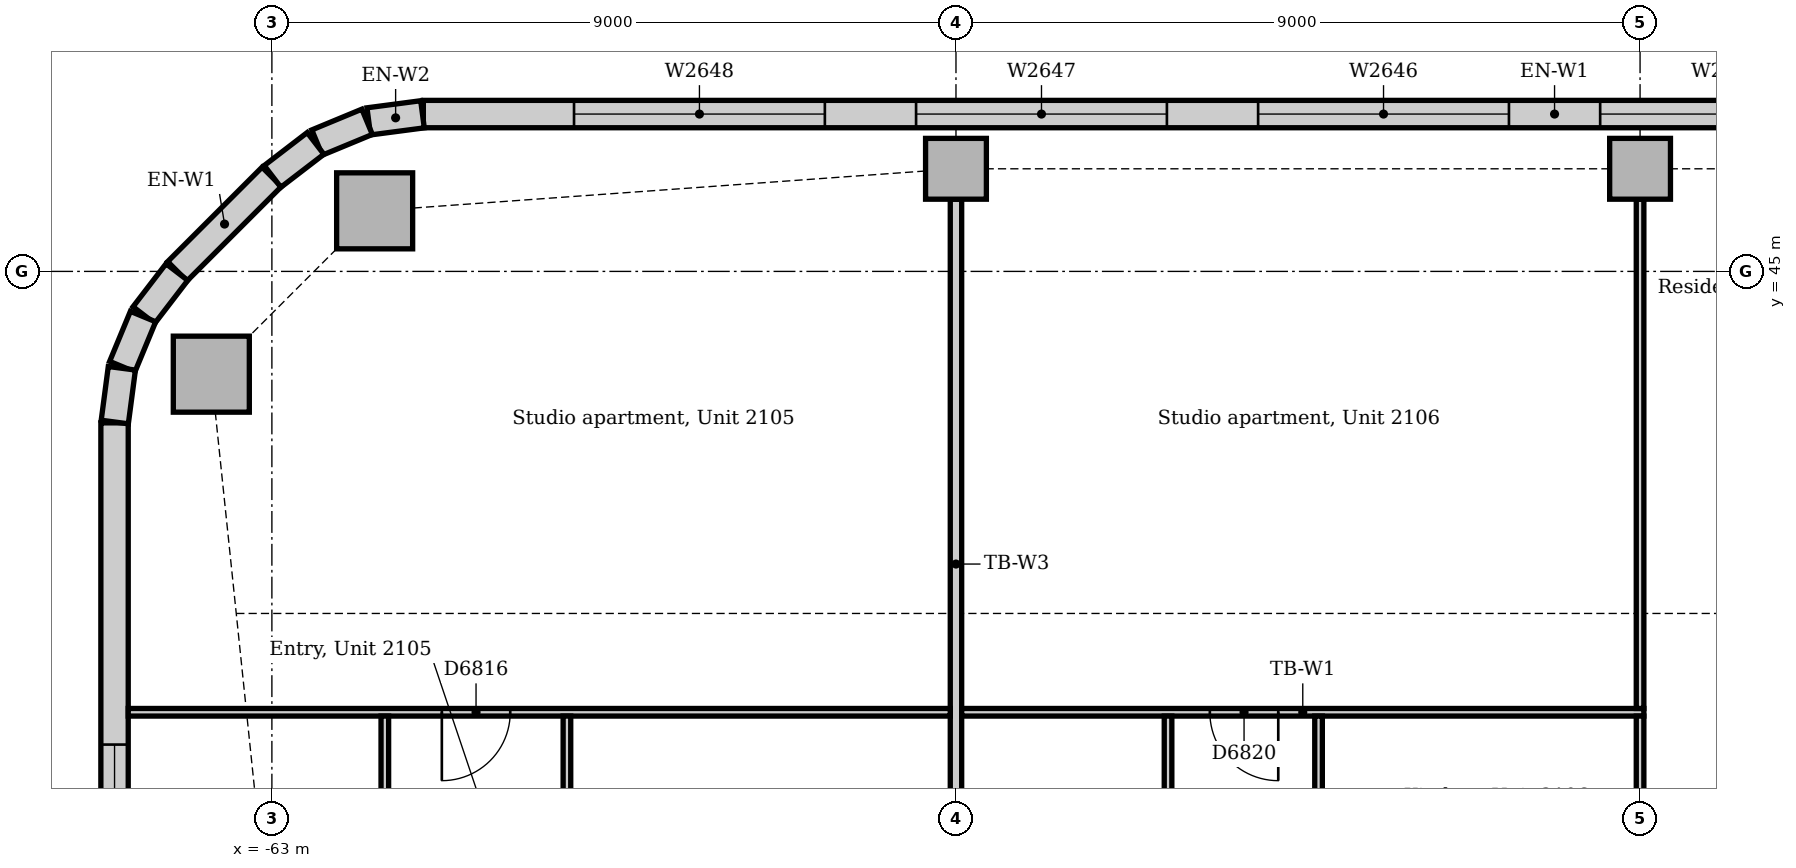
"""IFC4 building model, lengths in metres.
Left out: names, types, materials, properties, quantities, classifications, styles, units other than length and angle.
Written with IfcOpenShell. Run it as: python <this file> out.ifc"""

import sys

from ifc_helpers import new_model, si_unit, direction, frame, frame_2d, origin, origin_2d, place, context, subcontext, project, spatial, rectangle, extrude, element, fill, save


model = new_model("IFC4")
c1 = context("Model", 3, precision=1e-05, world=origin(), true_north=direction((0.0, 1.0)))
c2 = subcontext(c1, "Body", "Model", "MODEL_VIEW")
j1 = project(units=[si_unit("LENGTHUNIT", "METRE"), si_unit("PLANEANGLEUNIT", "RADIAN")], contexts=[c1])
p1 = place(None, origin())
s1 = spatial("IfcSite", under=j1, at=p1, CompositionType="ELEMENT")
p2 = place(p1, origin())
s2 = spatial("IfcBuilding", under=s1, at=p2, CompositionType="ELEMENT")
p3 = place(p2, frame((0.0, 0.0, 91.0)))
s3 = spatial("IfcBuildingStorey", under=s2, at=p3, CompositionType="ELEMENT", Elevation=91.0)
for number, where, z_axis, x_axis in (
    (1, (-61.648, 45.797, 0.0), (0.0, 0.0, 1.0), (1.0, 0.0, 0.0)),
    (2, (-63.797, 43.648, 0.0), (0.0, 0.0, 1.0), (1.0, 0.0, 0.0)),
):
    element("IfcColumn", number, at=place(p3, frame(where, z_axis=z_axis, x_axis=x_axis)), inside=s3, PredefinedType="COLUMN", context=c2, shape_type="SweptSolid", body=[
        extrude(rectangle(XDim=1.0, YDim=1.0, at=origin_2d()), origin(), (0.0, 0.0, 1.0), 3.7),
    ])
for number, where, z_axis, x_axis in (
    (3, (-54.0, 46.35, 0.0), (0.0, 0.0, 1.0), (1.0, 0.0, 0.0)),
    (4, (-45.0, 46.35, 0.0), (0.0, 0.0, 1.0), (1.0, 0.0, 0.0)),
):
    element("IfcColumn", number, at=place(p3, frame(where, z_axis=z_axis, x_axis=x_axis)), inside=s3, PredefinedType="COLUMN", context=c2, shape_type="SweptSolid", body=[
        extrude(rectangle(XDim=0.8, YDim=0.8, at=origin_2d()), origin(), (0.0, 0.0, 1.0), 3.7),
    ])
p4 = place(p3, frame((-31.243, 47.07, 0.0), z_axis=(0.0, 0.0, 1.0), x_axis=(-1.0, 0.0, 0.0)))
e5 = element("IfcWall", 5, at=p4, inside=s3, PredefinedType="STANDARD", context=c2, shape_type="SweptSolid", body=[
    extrude(rectangle(XDim=29.765, YDim=0.36, at=frame_2d((14.882, 0.0))), origin(), (0.0, 0.0, 1.0), 3.7),
])
p5 = place(p4, frame((1.982, 0.0, 0.9)))
e6 = element("IfcOpeningElement", 6, at=p5, cuts=e5, PredefinedType="OPENING", context=c2, shape_type="SweptSolid", body=[
    extrude(rectangle(XDim=3.3, YDim=1.6, at=frame_2d((1.65, 0.8))), frame((0.0, 0.19, 0.0), z_axis=(0.0, -1.0, 0.0), x_axis=(1.0, 0.0, 0.0)), (0.0, 0.0, 1.0), 0.38),
])
p6 = place(p4, frame((6.482, 0.0, 0.9)))
e7 = element("IfcOpeningElement", 7, at=p6, cuts=e5, PredefinedType="OPENING", context=c2, shape_type="SweptSolid", body=[
    extrude(rectangle(XDim=3.3, YDim=1.6, at=frame_2d((1.65, 0.8))), frame((0.0, 0.19, 0.0), z_axis=(0.0, -1.0, 0.0), x_axis=(1.0, 0.0, 0.0)), (0.0, 0.0, 1.0), 0.38),
])
p7 = place(p4, frame((10.982, 0.0, 0.9)))
e8 = element("IfcOpeningElement", 8, at=p7, cuts=e5, PredefinedType="OPENING", context=c2, shape_type="SweptSolid", body=[
    extrude(rectangle(XDim=3.3, YDim=1.6, at=frame_2d((1.65, 0.8))), frame((0.0, 0.19, 0.0), z_axis=(0.0, -1.0, 0.0), x_axis=(1.0, 0.0, 0.0)), (0.0, 0.0, 1.0), 0.38),
])
p8 = place(p4, frame((15.482, 0.0, 0.9)))
e9 = element("IfcOpeningElement", 9, at=p8, cuts=e5, PredefinedType="OPENING", context=c2, shape_type="SweptSolid", body=[
    extrude(rectangle(XDim=3.3, YDim=1.6, at=frame_2d((1.65, 0.8))), frame((0.0, 0.19, 0.0), z_axis=(0.0, -1.0, 0.0), x_axis=(1.0, 0.0, 0.0)), (0.0, 0.0, 1.0), 0.38),
])
p9 = place(p4, frame((19.982, 0.0, 0.9)))
e10 = element("IfcOpeningElement", 10, at=p9, cuts=e5, PredefinedType="OPENING", context=c2, shape_type="SweptSolid", body=[
    extrude(rectangle(XDim=3.3, YDim=1.6, at=frame_2d((1.65, 0.8))), frame((0.0, 0.19, 0.0), z_axis=(0.0, -1.0, 0.0), x_axis=(1.0, 0.0, 0.0)), (0.0, 0.0, 1.0), 0.38),
])
p10 = place(p4, frame((24.482, 0.0, 0.9)))
e11 = element("IfcOpeningElement", 11, at=p10, cuts=e5, PredefinedType="OPENING", context=c2, shape_type="SweptSolid", body=[
    extrude(rectangle(XDim=3.3, YDim=1.6, at=frame_2d((1.65, 0.8))), frame((0.0, 0.19, 0.0), z_axis=(0.0, -1.0, 0.0), x_axis=(1.0, 0.0, 0.0)), (0.0, 0.0, 1.0), 0.38),
])
p11 = place(p3, frame((-63.001, 46.244, 0.0), z_axis=(0.0, 0.0, 1.0), x_axis=(-0.707106781187, -0.707106781187, 0.0)))
e12 = element("IfcWall", 12, at=p11, inside=s3, PredefinedType="STANDARD", context=c2, shape_type="SweptSolid", body=[
    extrude(rectangle(XDim=1.757, YDim=0.36, at=frame_2d((0.879, 0.0))), origin(), (0.0, 0.0, 1.0), 3.7),
])
p12 = place(p3, frame((-65.07, 43.007, 0.0), z_axis=(0.0, 0.0, 1.0), x_axis=(0.0, -1.0, 0.0)))
e13 = element("IfcWall", 13, at=p12, inside=s3, PredefinedType="STANDARD", context=c2, shape_type="SweptSolid", body=[
    extrude(rectangle(XDim=23.765, YDim=0.36, at=frame_2d((11.882, 0.0))), origin(), (0.0, 0.0, 1.0), 3.7),
])
p13 = place(p12, frame((4.232, 0.0, 0.9)))
e14 = element("IfcOpeningElement", 14, at=p13, cuts=e13, PredefinedType="OPENING", context=c2, shape_type="SweptSolid", body=[
    extrude(rectangle(XDim=1.8, YDim=1.6, at=frame_2d((0.9, 0.8))), frame((0.0, 0.19, 0.0), z_axis=(0.0, -1.0, 0.0), x_axis=(1.0, 0.0, 0.0)), (0.0, 0.0, 1.0), 0.38),
])
p14 = place(p12, frame((9.332, 0.0, 0.9)))
e15 = element("IfcOpeningElement", 15, at=p14, cuts=e13, PredefinedType="OPENING", context=c2, shape_type="SweptSolid", body=[
    extrude(rectangle(XDim=1.8, YDim=1.6, at=frame_2d((0.9, 0.8))), frame((0.0, 0.19, 0.0), z_axis=(0.0, -1.0, 0.0), x_axis=(1.0, 0.0, 0.0)), (0.0, 0.0, 1.0), 0.38),
])
p15 = place(p12, frame((12.482, 0.0, 0.9)))
e16 = element("IfcOpeningElement", 16, at=p15, cuts=e13, PredefinedType="OPENING", context=c2, shape_type="SweptSolid", body=[
    extrude(rectangle(XDim=3.3, YDim=1.6, at=frame_2d((1.65, 0.8))), frame((0.0, 0.19, 0.0), z_axis=(0.0, -1.0, 0.0), x_axis=(1.0, 0.0, 0.0)), (0.0, 0.0, 1.0), 0.38),
])
p16 = place(p12, frame((16.982, 0.0, 0.9)))
e17 = element("IfcOpeningElement", 17, at=p16, cuts=e13, PredefinedType="OPENING", context=c2, shape_type="SweptSolid", body=[
    extrude(rectangle(XDim=3.3, YDim=1.6, at=frame_2d((1.65, 0.8))), frame((0.0, 0.19, 0.0), z_axis=(0.0, -1.0, 0.0), x_axis=(1.0, 0.0, 0.0)), (0.0, 0.0, 1.0), 0.38),
])
for number, where, z_axis, x_axis in (
    (18, (-61.019, 47.067, 0.0), (0.0, 0.0, 1.0), (-0.991, -0.131, 0.0)),
    (19, (-61.747, 46.968, 0.0), (0.0, 0.0, 1.0), (-0.924, -0.383, 0.0)),
):
    element("IfcWall", number, at=place(p3, frame(where, z_axis=z_axis, x_axis=x_axis)), inside=s3, PredefinedType="STANDARD", context=c2, shape_type="SweptSolid", body=[
        extrude(rectangle(XDim=0.713, YDim=0.36, at=frame_2d((0.356, 0.0))), origin(), (0.0, 0.0, 1.0), 3.7),
    ])
for number, where, z_axis, x_axis in (
    (20, (-62.425, 46.684, 0.0), (0.0, 0.0, 1.0), (-0.793, -0.609, 0.0)),
    (21, (-64.25, 44.991, 0.0), (0.0, 0.0, 1.0), (-0.609, -0.793, 0.0)),
):
    element("IfcWall", number, at=place(p3, frame(where, z_axis=z_axis, x_axis=x_axis)), inside=s3, PredefinedType="STANDARD", context=c2, shape_type="SweptSolid", body=[
        extrude(rectangle(XDim=0.713, YDim=0.36, at=frame_2d((0.357, 0.0))), origin(), (0.0, 0.0, 1.0), 3.7),
    ])
for number, where, z_axis, x_axis in (
    (22, (-64.695, 44.406, 0.0), (0.0, 0.0, 1.0), (-0.383, -0.924, 0.0)),
    (23, (-64.974, 43.726, 0.0), (0.0, 0.0, 1.0), (-0.131, -0.991, 0.0)),
):
    element("IfcWall", number, at=place(p3, frame(where, z_axis=z_axis, x_axis=x_axis)), inside=s3, PredefinedType="STANDARD", context=c2, shape_type="SweptSolid", body=[
        extrude(rectangle(XDim=0.713, YDim=0.36, at=frame_2d((0.356, 0.0))), origin(), (0.0, 0.0, 1.0), 3.7),
    ])
p17 = place(p3, frame((-54.0, 36.35, 0.0), z_axis=(0.0, 0.0, 1.0), x_axis=(0.0, 1.0, 0.0)))
e24 = element("IfcWall", 24, at=p17, inside=s3, PredefinedType="PARTITIONING", context=c2, shape_type="SweptSolid", body=[
    extrude(rectangle(XDim=9.6, YDim=0.15, at=frame_2d((4.8, 0.0))), origin(), (0.0, 0.0, 1.0), 3.106),
])
p18 = place(p3, frame((-53.925, 39.2, 0.0), z_axis=(0.0, 0.0, 1.0), x_axis=(1.0, 0.0, 0.0)))
e25 = element("IfcWall", 25, at=p18, inside=s3, PredefinedType="PARTITIONING", context=c2, shape_type="SweptSolid", body=[
    extrude(rectangle(XDim=8.975, YDim=0.1, at=frame_2d((4.487, 0.0))), origin(), (0.0, 0.0, 1.0), 3.7),
])
p19 = place(p18, frame((3.265, 0.0, 0.0)))
e26 = element("IfcOpeningElement", 26, at=p19, cuts=e25, PredefinedType="OPENING", context=c2, shape_type="SweptSolid", body=[
    extrude(rectangle(XDim=0.9, YDim=2.1, at=frame_2d((0.45, 1.05))), frame((0.0, 0.06, 0.0), z_axis=(0.0, -1.0, 0.0), x_axis=(1.0, 0.0, 0.0)), (0.0, 0.0, 1.0), 0.12),
])
p20 = place(p3, frame((-64.89, 39.2, 0.0), z_axis=(0.0, 0.0, 1.0), x_axis=(1.0, 0.0, 0.0)))
e27 = element("IfcWall", 27, at=p20, inside=s3, PredefinedType="PARTITIONING", context=c2, shape_type="SweptSolid", body=[
    extrude(rectangle(XDim=10.815, YDim=0.1, at=frame_2d((5.407, 0.0))), origin(), (0.0, 0.0, 1.0), 3.7),
])
p21 = place(p20, frame((4.126, 0.0, 0.0)))
e28 = element("IfcOpeningElement", 28, at=p21, cuts=e27, PredefinedType="OPENING", context=c2, shape_type="SweptSolid", body=[
    extrude(rectangle(XDim=0.9, YDim=2.1, at=frame_2d((0.45, 1.05))), frame((0.0, 0.06, 0.0), z_axis=(0.0, -1.0, 0.0), x_axis=(1.0, 0.0, 0.0)), (0.0, 0.0, 1.0), 0.12),
])
p22 = place(p3, frame((-45.0, 39.25, 0.0), z_axis=(0.0, 0.0, 1.0), x_axis=(0.0, 1.0, 0.0)))
e29 = element("IfcWall", 29, at=p22, inside=s3, PredefinedType="PARTITIONING", context=c2, shape_type="SweptSolid", body=[
    extrude(rectangle(XDim=6.7, YDim=0.1, at=frame_2d((3.35, 0.0))), origin(), (0.0, 0.0, 1.0), 3.106),
])
p23 = place(p3, frame((-45.0, 36.35, 0.0), z_axis=(0.0, 0.0, 1.0), x_axis=(0.0, 1.0, 0.0)))
e30 = element("IfcWall", 30, at=p23, inside=s3, PredefinedType="PARTITIONING", context=c2, shape_type="SweptSolid", body=[
    extrude(rectangle(XDim=2.8, YDim=0.1, at=frame_2d((1.4, 0.0))), origin(), (0.0, 0.0, 1.0), 3.106),
])
p24 = place(p3, frame((-61.514, 36.075, 0.0), z_axis=(0.0, 0.0, 1.0), x_axis=(0.0, 1.0, 0.0)))
e31 = element("IfcWall", 31, at=p24, inside=s3, PredefinedType="PARTITIONING", context=c2, shape_type="SweptSolid", body=[
    extrude(rectangle(XDim=3.075, YDim=0.1, at=frame_2d((1.538, 0.0))), origin(), (0.0, 0.0, 1.0), 3.7),
])
p25 = place(p24, frame((1.1, 0.0, 0.0)))
e32 = element("IfcOpeningElement", 32, at=p25, cuts=e31, PredefinedType="OPENING", context=c2, shape_type="SweptSolid", body=[
    extrude(rectangle(XDim=0.9, YDim=2.1, at=frame_2d((0.45, 1.05))), frame((0.0, 0.06, 0.0), z_axis=(0.0, -1.0, 0.0), x_axis=(1.0, 0.0, 0.0)), (0.0, 0.0, 1.0), 0.12),
])
p26 = place(p3, frame((-59.118, 36.075, 0.0), z_axis=(0.0, 0.0, 1.0), x_axis=(0.0, 1.0, 0.0)))
e33 = element("IfcWall", 33, at=p26, inside=s3, PredefinedType="PARTITIONING", context=c2, shape_type="SweptSolid", body=[
    extrude(rectangle(XDim=3.075, YDim=0.1, at=frame_2d((1.538, 0.0))), origin(), (0.0, 0.0, 1.0), 3.7),
])
p27 = place(p26, frame((1.1, 0.0, 0.0)))
e34 = element("IfcOpeningElement", 34, at=p27, cuts=e33, PredefinedType="OPENING", context=c2, shape_type="SweptSolid", body=[
    extrude(rectangle(XDim=0.9, YDim=2.1, at=frame_2d((0.45, 1.05))), frame((0.0, 0.06, 0.0), z_axis=(0.0, -1.0, 0.0), x_axis=(1.0, 0.0, 0.0)), (0.0, 0.0, 1.0), 0.12),
])
p28 = place(p3, frame((-51.21, 36.075, 0.0), z_axis=(0.0, 0.0, 1.0), x_axis=(0.0, 1.0, 0.0)))
e35 = element("IfcWall", 35, at=p28, inside=s3, PredefinedType="PARTITIONING", context=c2, shape_type="SweptSolid", body=[
    extrude(rectangle(XDim=3.075, YDim=0.1, at=frame_2d((1.538, 0.0))), origin(), (0.0, 0.0, 1.0), 3.7),
])
p29 = place(p28, frame((1.1, 0.0, 0.0)))
e36 = element("IfcOpeningElement", 36, at=p29, cuts=e35, PredefinedType="OPENING", context=c2, shape_type="SweptSolid", body=[
    extrude(rectangle(XDim=0.9, YDim=2.1, at=frame_2d((0.45, 1.05))), frame((0.0, 0.06, 0.0), z_axis=(0.0, -1.0, 0.0), x_axis=(1.0, 0.0, 0.0)), (0.0, 0.0, 1.0), 0.12),
])
p30 = place(p3, frame((-49.23, 36.075, 0.0), z_axis=(0.0, 0.0, 1.0), x_axis=(0.0, 1.0, 0.0)))
e37 = element("IfcWall", 37, at=p30, inside=s3, PredefinedType="PARTITIONING", context=c2, shape_type="SweptSolid", body=[
    extrude(rectangle(XDim=3.075, YDim=0.1, at=frame_2d((1.538, 0.0))), origin(), (0.0, 0.0, 1.0), 3.7),
])
p31 = place(p30, frame((1.1, 0.0, 0.0)))
e38 = element("IfcOpeningElement", 38, at=p31, cuts=e37, PredefinedType="OPENING", context=c2, shape_type="SweptSolid", body=[
    extrude(rectangle(XDim=0.9, YDim=2.1, at=frame_2d((0.45, 1.05))), frame((0.0, 0.06, 0.0), z_axis=(0.0, -1.0, 0.0), x_axis=(1.0, 0.0, 0.0)), (0.0, 0.0, 1.0), 0.12),
])
p32 = place(p7, origin())
e39 = element("IfcWindow", 39, at=p32, inside=s3, PartitioningType="SINGLE_PANEL", PredefinedType="WINDOW", context=c2, shape_type="SweptSolid", body=[
    extrude(rectangle(XDim=3.3, YDim=1.6, at=frame_2d((1.65, 0.8))), frame((0.0, 0.13, 0.0), z_axis=(0.0, -1.0, 0.0), x_axis=(1.0, 0.0, 0.0)), (0.0, 0.0, 1.0), 0.06),
])
fill(e8, e39)
p33 = place(p8, origin())
e40 = element("IfcWindow", 40, at=p33, inside=s3, PartitioningType="SINGLE_PANEL", PredefinedType="WINDOW", context=c2, shape_type="SweptSolid", body=[
    extrude(rectangle(XDim=3.3, YDim=1.6, at=frame_2d((1.65, 0.8))), frame((0.0, 0.13, 0.0), z_axis=(0.0, -1.0, 0.0), x_axis=(1.0, 0.0, 0.0)), (0.0, 0.0, 1.0), 0.06),
])
fill(e9, e40)
p34 = place(p9, origin())
e41 = element("IfcWindow", 41, at=p34, inside=s3, PartitioningType="SINGLE_PANEL", PredefinedType="WINDOW", context=c2, shape_type="SweptSolid", body=[
    extrude(rectangle(XDim=3.3, YDim=1.6, at=frame_2d((1.65, 0.8))), frame((0.0, 0.13, 0.0), z_axis=(0.0, -1.0, 0.0), x_axis=(1.0, 0.0, 0.0)), (0.0, 0.0, 1.0), 0.06),
])
fill(e10, e41)
p35 = place(p10, origin())
e42 = element("IfcWindow", 42, at=p35, inside=s3, PartitioningType="SINGLE_PANEL", PredefinedType="WINDOW", context=c2, shape_type="SweptSolid", body=[
    extrude(rectangle(XDim=3.3, YDim=1.6, at=frame_2d((1.65, 0.8))), frame((0.0, 0.13, 0.0), z_axis=(0.0, -1.0, 0.0), x_axis=(1.0, 0.0, 0.0)), (0.0, 0.0, 1.0), 0.06),
])
fill(e11, e42)
p36 = place(p13, origin())
e43 = element("IfcWindow", 43, at=p36, inside=s3, PartitioningType="SINGLE_PANEL", PredefinedType="WINDOW", context=c2, shape_type="SweptSolid", body=[
    extrude(rectangle(XDim=1.8, YDim=1.6, at=frame_2d((0.9, 0.8))), frame((0.0, 0.13, 0.0), z_axis=(0.0, -1.0, 0.0), x_axis=(1.0, 0.0, 0.0)), (0.0, 0.0, 1.0), 0.06),
])
fill(e14, e43)
p37 = place(p21, frame((0.9, 0.0, 0.0), z_axis=(0.0, 0.0, 1.0), x_axis=(-1.0, 0.0, 0.0)))
e44 = element("IfcDoor", 44, at=p37, inside=s3, OperationType="SINGLE_SWING_RIGHT", PredefinedType="DOOR", context=c2, shape_type="SweptSolid", body=[
    extrude(rectangle(XDim=0.9, YDim=2.1, at=frame_2d((0.45, 1.05))), frame((0.0, 0.025, 0.0), z_axis=(0.0, -1.0, 0.0), x_axis=(1.0, 0.0, 0.0)), (0.0, 0.0, 1.0), 0.05),
])
fill(e28, e44)
p38 = place(p19, frame((0.9, 0.0, 0.0), z_axis=(0.0, 0.0, 1.0), x_axis=(-1.0, 0.0, 0.0)))
e45 = element("IfcDoor", 45, at=p38, inside=s3, OperationType="SINGLE_SWING_LEFT", PredefinedType="DOOR", context=c2, shape_type="SweptSolid", body=[
    extrude(rectangle(XDim=0.9, YDim=2.1, at=frame_2d((0.45, 1.05))), frame((0.0, 0.025, 0.0), z_axis=(0.0, -1.0, 0.0), x_axis=(1.0, 0.0, 0.0)), (0.0, 0.0, 1.0), 0.05),
])
fill(e26, e45)
save(model, sys.argv[1])
